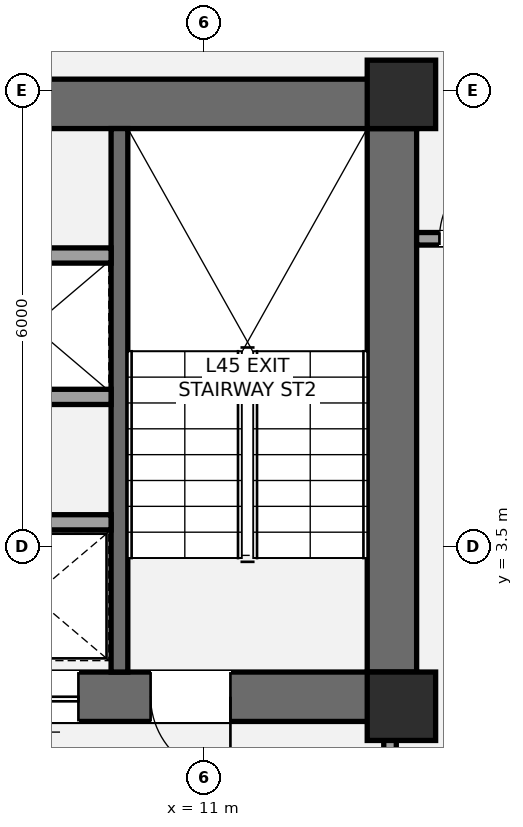
"""IFC4 building model, lengths in metres.
Left out: names, types, materials, properties, quantities, classifications, styles, units other than length and angle.
Written with IfcOpenShell. Run it as: python <this file> out.ifc"""

import sys

from ifc_helpers import new_model, si_unit, direction, frame, frame_2d, origin, origin_2d, place, context, subcontext, project, spatial, rectangle, extrude, element, fill, save


model = new_model("IFC4")
c1 = context("Model", 3, precision=1e-05, world=origin(), true_north=direction((0.0, 1.0)))
c2 = subcontext(c1, "Body", "Model", "MODEL_VIEW")
j1 = project(units=[si_unit("LENGTHUNIT", "METRE"), si_unit("PLANEANGLEUNIT", "RADIAN")], contexts=[c1])
p1 = place(None, origin())
s1 = spatial("IfcSite", under=j1, at=p1, CompositionType="ELEMENT")
p2 = place(p1, origin())
s2 = spatial("IfcBuilding", under=s1, at=p2, CompositionType="ELEMENT")
p3 = place(p2, frame((0.0, 0.0, 166.2)))
s3 = spatial("IfcBuildingStorey", under=s2, at=p3, CompositionType="ELEMENT", Elevation=166.2)
p4 = place(p3, frame((13.475, 1.2, 0.0), z_axis=(0.0, 0.0, 1.0), x_axis=(0.0, 1.0, 0.0)))
e1 = element("IfcWall", 1, at=p4, inside=s3, PredefinedType="SHEAR", context=c2, shape_type="SweptSolid", body=[
    extrude(rectangle(XDim=8.45, YDim=0.65, at=frame_2d((4.225, 0.0))), origin(), (0.0, 0.0, 1.0), 3.2),
])
p5 = place(p3, frame((4.475, 9.325, 0.0), z_axis=(0.0, 0.0, 1.0), x_axis=(1.0, 0.0, 0.0)))
e2 = element("IfcWall", 2, at=p5, inside=s3, PredefinedType="SHEAR", context=c2, shape_type="SweptSolid", body=[
    extrude(rectangle(XDim=9.325, YDim=0.65, at=frame_2d((4.663, 0.0))), origin(), (0.0, 0.0, 1.0), 3.2),
])
p6 = place(p3, frame((13.8, 1.525, 0.0), z_axis=(0.0, 0.0, 1.0), x_axis=(-1.0, 0.0, 0.0)))
e3 = element("IfcWall", 3, at=p6, inside=s3, PredefinedType="SHEAR", context=c2, shape_type="SweptSolid", body=[
    extrude(rectangle(XDim=8.925, YDim=0.65, at=frame_2d((4.462, 0.0))), origin(), (0.0, 0.0, 1.0), 3.2),
])
p7 = place(p6, frame((2.45, 0.0, 0.0)))
e4 = element("IfcOpeningElement", 4, at=p7, cuts=e3, PredefinedType="OPENING", context=c2, shape_type="SweptSolid", body=[
    extrude(rectangle(XDim=1.05, YDim=2.15, at=frame_2d((0.525, 1.075))), frame((0.0, 0.335, 0.0), z_axis=(0.0, -1.0, 0.0), x_axis=(1.0, 0.0, 0.0)), (0.0, 0.0, 1.0), 0.67),
])
p8 = place(p6, frame((4.45, 0.0, 0.0)))
e5 = element("IfcOpeningElement", 5, at=p8, cuts=e3, PredefinedType="OPENING", context=c2, shape_type="SweptSolid", body=[
    extrude(rectangle(XDim=1.1, YDim=2.2, at=frame_2d((0.55, 1.1))), frame((0.0, 0.335, 0.0), z_axis=(0.0, -1.0, 0.0), x_axis=(1.0, 0.0, 0.0)), (0.0, 0.0, 1.0), 0.67),
])
p9 = place(p3, frame((9.89, 1.85, 0.0), z_axis=(0.0, 0.0, 1.0), x_axis=(0.0, 1.0, 0.0)))
e6 = element("IfcWall", 6, at=p9, inside=s3, PredefinedType="SHEAR", context=c2, shape_type="SweptSolid", body=[
    extrude(rectangle(XDim=7.15, YDim=0.22, at=frame_2d((3.575, 0.0))), origin(), (0.0, 0.0, 1.0), 3.2),
])
for number, where, z_axis, x_axis in (
    (7, (13.6, 1.4, 0.0), (0.0, 0.0, 1.0), (1.0, 0.0, 0.0)),
    (8, (13.6, 9.45, 0.0), (0.0, 0.0, 1.0), (1.0, 0.0, 0.0)),
):
    element("IfcColumn", number, at=place(p3, frame(where, z_axis=z_axis, x_axis=x_axis)), inside=s3, PredefinedType="COLUMN", context=c2, shape_type="SweptSolid", body=[
        extrude(rectangle(XDim=0.9, YDim=0.9, at=origin_2d()), origin(), (0.0, 0.0, 1.0), 3.2),
    ])
p10 = place(p3, frame((13.45, -2.15, 0.0), z_axis=(0.0, 0.0, 1.0), x_axis=(0.0, 1.0, 0.0)))
e9 = element("IfcWall", 9, at=p10, inside=s3, PredefinedType="PARTITIONING", context=c2, shape_type="SweptSolid", body=[
    extrude(rectangle(XDim=3.4, YDim=0.165, at=frame_2d((1.7, 0.0))), origin(), (0.0, 0.0, 1.0), 3.02),
])
p11 = place(p10, frame((1.15, 0.0, 0.0)))
e10 = element("IfcOpeningElement", 10, at=p11, cuts=e9, PredefinedType="OPENING", context=c2, shape_type="SweptSolid", body=[
    extrude(rectangle(XDim=1.05, YDim=2.15, at=frame_2d((0.525, 1.075))), frame((0.0, 0.093, 0.0), z_axis=(0.0, -1.0, 0.0), x_axis=(1.0, 0.0, 0.0)), (0.0, 0.0, 1.0), 0.185),
])
p12 = place(p3, frame((5.525, 3.82, 0.0), z_axis=(0.0, 0.0, 1.0), x_axis=(1.0, 0.0, 0.0)))
e11 = element("IfcWall", 11, at=p12, inside=s3, PredefinedType="SOLIDWALL", context=c2, shape_type="SweptSolid", body=[
    extrude(rectangle(XDim=4.255, YDim=0.2, at=frame_2d((2.127, 0.0))), origin(), (0.0, 0.0, 1.0), 3.02),
])
p13 = place(p12, frame((0.65, 0.0, 0.0)))
e12 = element("IfcOpeningElement", 12, at=p13, cuts=e11, PredefinedType="OPENING", context=c2, shape_type="SweptSolid", body=[
    extrude(rectangle(XDim=1.2, YDim=2.2, at=frame_2d((0.6, 1.1))), frame((0.0, 0.11, 0.0), z_axis=(0.0, -1.0, 0.0), x_axis=(1.0, 0.0, 0.0)), (0.0, 0.0, 1.0), 0.22),
])
for number, where, z_axis, x_axis in (
    (13, (5.525, 5.47, 0.0), (0.0, 0.0, 1.0), (1.0, 0.0, 0.0)),
    (14, (5.525, 7.33, 0.0), (0.0, 0.0, 1.0), (1.0, 0.0, 0.0)),
):
    element("IfcWall", number, at=place(p3, frame(where, z_axis=z_axis, x_axis=x_axis)), inside=s3, PredefinedType="SOLIDWALL", context=c2, shape_type="SweptSolid", body=[
        extrude(rectangle(XDim=4.255, YDim=0.2, at=frame_2d((2.127, 0.0))), origin(), (0.0, 0.0, 1.0), 3.02),
    ])
p14 = place(p3, frame((13.8, 7.55, 0.0), z_axis=(0.0, 0.0, 1.0), x_axis=(1.0, 0.0, 0.0)))
e15 = element("IfcWall", 15, at=p14, inside=s3, PredefinedType="PARTITIONING", context=c2, shape_type="SweptSolid", body=[
    extrude(rectangle(XDim=1.75, YDim=0.165, at=frame_2d((0.875, 0.0))), origin(), (0.0, 0.0, 1.0), 2.473),
])
p15 = place(p14, frame((0.3, 0.0, 0.0)))
e16 = element("IfcOpeningElement", 16, at=p15, cuts=e15, PredefinedType="OPENING", context=c2, shape_type="SweptSolid", body=[
    extrude(rectangle(XDim=1.0, YDim=2.15, at=frame_2d((0.5, 1.075))), frame((0.0, 0.093, 0.0), z_axis=(0.0, -1.0, 0.0), x_axis=(1.0, 0.0, 0.0)), (0.0, 0.0, 1.0), 0.185),
])
p16 = place(p7, origin())
e17 = element("IfcDoor", 17, at=p16, inside=s3, OperationType="SINGLE_SWING_LEFT", PredefinedType="DOOR", context=c2, shape_type="SweptSolid", body=[
    extrude(rectangle(XDim=1.05, YDim=2.15, at=frame_2d((0.525, 1.075))), frame((0.0, 0.025, 0.0), z_axis=(0.0, -1.0, 0.0), x_axis=(1.0, 0.0, 0.0)), (0.0, 0.0, 1.0), 0.05),
])
fill(e4, e17)
p17 = place(p8, origin())
e18 = element("IfcDoor", 18, at=p17, inside=s3, OperationType="SLIDING_TO_LEFT", PredefinedType="DOOR", context=c2, shape_type="SweptSolid", body=[
    extrude(rectangle(XDim=1.1, YDim=2.2, at=frame_2d((0.55, 1.1))), frame((0.0, 0.025, 0.0), z_axis=(0.0, -1.0, 0.0), x_axis=(1.0, 0.0, 0.0)), (0.0, 0.0, 1.0), 0.05),
])
fill(e5, e18)
p18 = place(p15, origin())
e19 = element("IfcDoor", 19, at=p18, inside=s3, OperationType="SINGLE_SWING_RIGHT", PredefinedType="DOOR", context=c2, shape_type="SweptSolid", body=[
    extrude(rectangle(XDim=1.0, YDim=2.15, at=frame_2d((0.5, 1.075))), frame((0.0, 0.025, 0.0), z_axis=(0.0, -1.0, 0.0), x_axis=(1.0, 0.0, 0.0)), (0.0, 0.0, 1.0), 0.05),
])
fill(e16, e19)
save(model, sys.argv[1])
